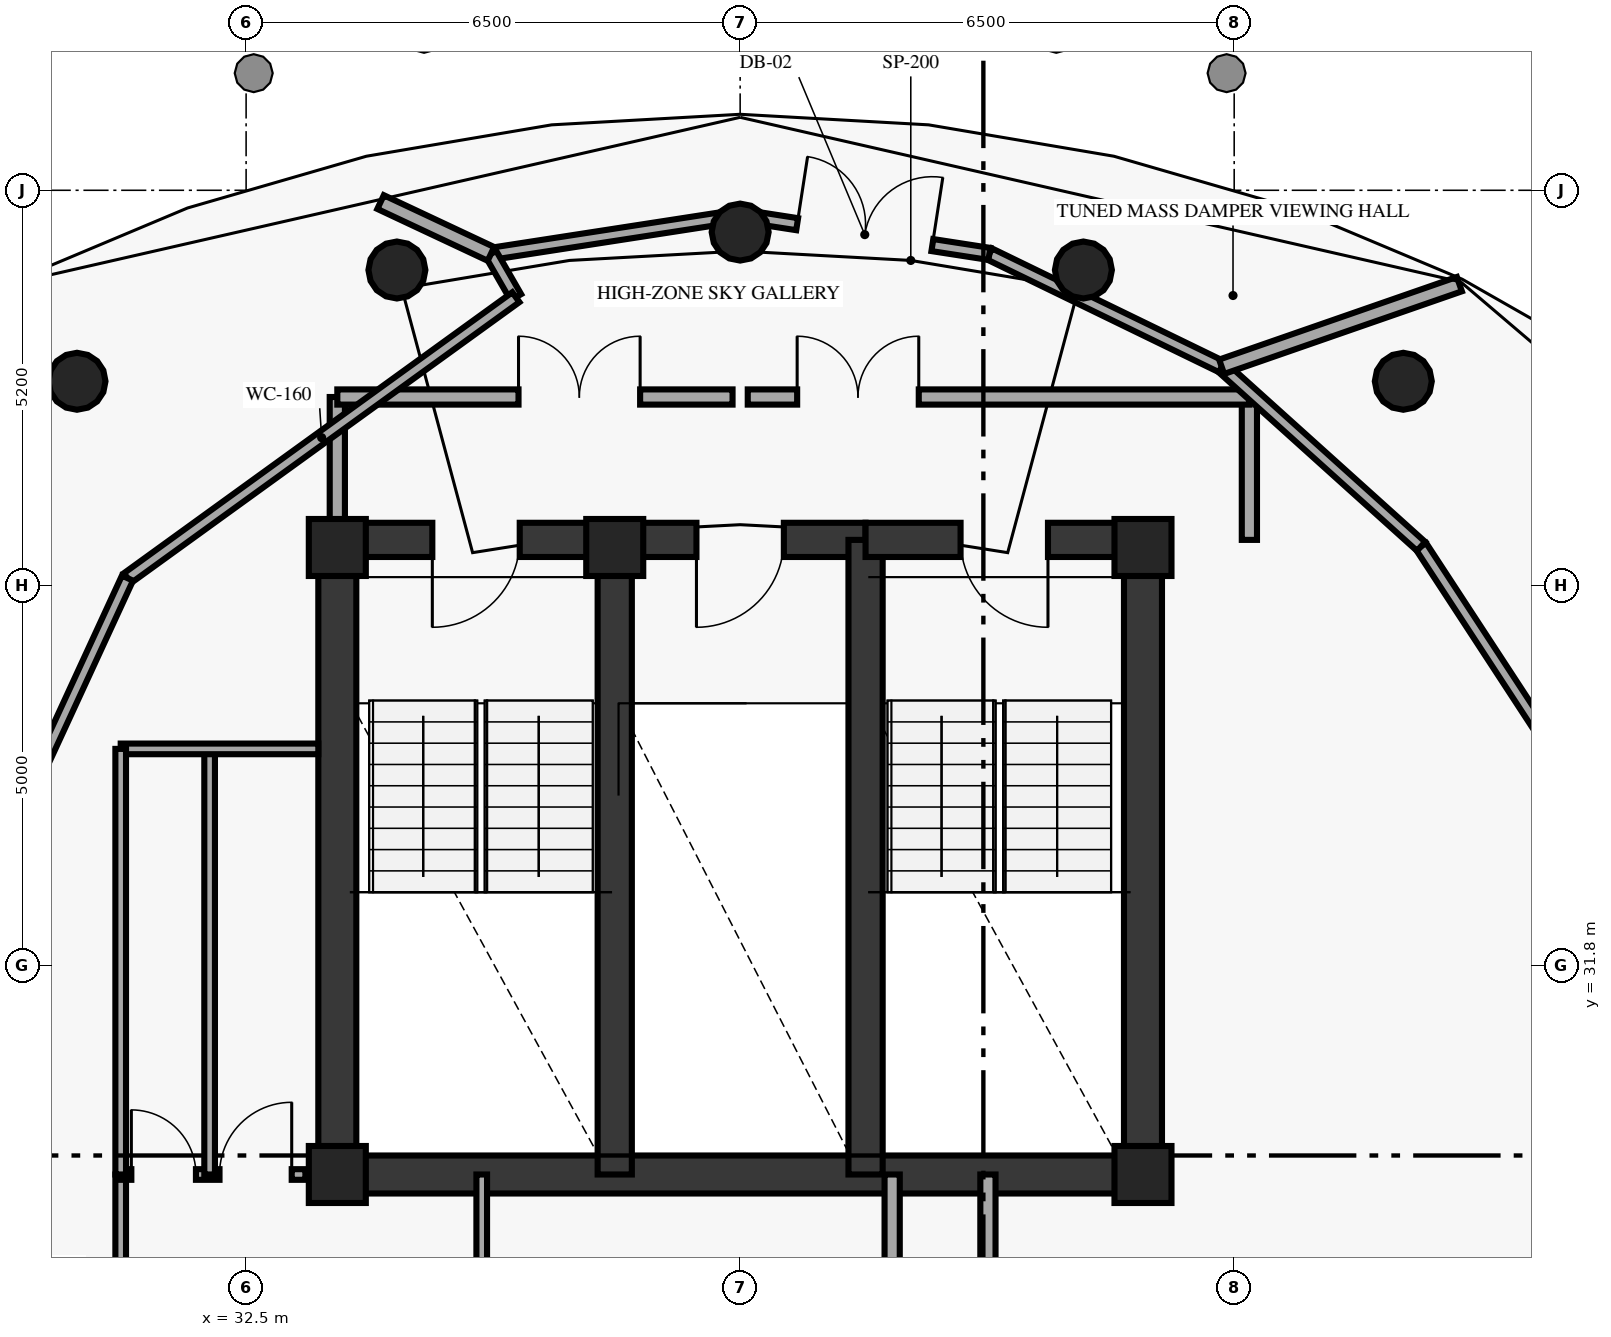
"""IFC4 building model, lengths in metres.
Left out: names, types, materials, properties, quantities, classifications, styles, units other than length and angle.
Written with IfcOpenShell. Run it as: python <this file> out.ifc"""

import sys

from ifc_helpers import new_model, si_unit, direction, frame, frame_2d, origin, origin_2d, place, context, subcontext, project, spatial, rectangle, circle, extrude, element, fill, save


model = new_model("IFC4")
c1 = context("Model", 3, precision=1e-05, world=origin(), true_north=direction((0.0, 1.0)))
c2 = subcontext(c1, "Body", "Model", "MODEL_VIEW")
j1 = project(units=[si_unit("LENGTHUNIT", "METRE"), si_unit("PLANEANGLEUNIT", "RADIAN")], contexts=[c1])
p1 = place(None, origin())
s1 = spatial("IfcSite", under=j1, at=p1, CompositionType="ELEMENT")
p2 = place(p1, origin())
s2 = spatial("IfcBuilding", under=s1, at=p2, CompositionType="ELEMENT")
p3 = place(p2, frame((0.0, 0.0, 306.8)))
s3 = spatial("IfcBuildingStorey", under=s2, at=p3, CompositionType="ELEMENT", Elevation=306.8)
for number, where, z_axis, x_axis in (
    (1, (44.3, 29.05, 0.0), (0.0, 0.0, 1.0), (1.0, 0.0, 0.0)),
    (2, (44.3, 37.3, 0.0), (0.0, 0.0, 1.0), (1.0, 0.0, 0.0)),
    (3, (37.35, 37.3, 0.0), (0.0, 0.0, 1.0), (1.0, 0.0, 0.0)),
    (4, (33.7, 37.3, 0.0), (0.0, 0.0, 1.0), (1.0, 0.0, 0.0)),
    (5, (33.7, 29.05, 0.0), (0.0, 0.0, 1.0), (1.0, 0.0, 0.0)),
):
    element("IfcColumn", number, at=place(p3, frame(where, z_axis=z_axis, x_axis=x_axis)), inside=s3, PredefinedType="PILASTER", context=c2, shape_type="SweptSolid", body=[
        extrude(rectangle(XDim=0.75, YDim=0.75, at=origin_2d()), origin(), (0.0, 0.0, 1.0), 6.18),
    ])
for number, where, z_axis, x_axis in (
    (6, (47.725, 39.487, 0.0), (0.0, 0.0, 1.0), (1.0, 0.0, 0.0)),
    (7, (43.516, 40.951, 0.0), (0.0, 0.0, 1.0), (1.0, 0.0, 0.0)),
    (8, (39.0, 41.45, 0.0), (0.0, 0.0, 1.0), (1.0, 0.0, 0.0)),
    (9, (34.484, 40.951, 0.0), (0.0, 0.0, 1.0), (1.0, 0.0, 0.0)),
    (10, (30.275, 39.487, 0.0), (0.0, 0.0, 1.0), (1.0, 0.0, 0.0)),
):
    element("IfcColumn", number, at=place(p3, frame(where, z_axis=z_axis, x_axis=x_axis)), inside=s3, PredefinedType="COLUMN", context=c2, shape_type="SweptSolid", body=[
        extrude(circle(Radius=0.375, at=origin_2d()), origin(), (0.0, 0.0, 1.0), 6.18),
    ])
for number, where, z_axis, x_axis in (
    (11, (33.7, 29.05, 0.0), (0.0, 0.0, 1.0), (0.0, 1.0, 0.0)),
    (12, (44.3, 29.05, 0.0), (0.0, 0.0, 1.0), (0.0, 1.0, 0.0)),
):
    element("IfcWall", number, at=place(p3, frame(where, z_axis=z_axis, x_axis=x_axis)), inside=s3, PredefinedType="SHEAR", context=c2, shape_type="SweptSolid", body=[
        extrude(rectangle(XDim=8.35, YDim=0.5, at=frame_2d((4.175, 0.0))), origin(), (0.0, 0.0, 1.0), 6.18),
    ])
p4 = place(p3, frame((33.7, 29.05, 0.0), z_axis=(0.0, 0.0, 1.0), x_axis=(1.0, 0.0, 0.0)))
e13 = element("IfcWall", 13, at=p4, inside=s3, PredefinedType="SHEAR", context=c2, shape_type="SweptSolid", body=[
    extrude(rectangle(XDim=10.6, YDim=0.5, at=frame_2d((5.3, 0.0))), origin(), (0.0, 0.0, 1.0), 6.18),
])
p5 = place(p3, frame((37.35, 37.4, 0.0), z_axis=(0.0, 0.0, 1.0), x_axis=(-1.0, 0.0, 0.0)))
e14 = element("IfcWall", 14, at=p5, inside=s3, PredefinedType="SHEAR", context=c2, shape_type="SweptSolid", body=[
    extrude(rectangle(XDim=3.65, YDim=0.45, at=frame_2d((1.825, 0.0))), origin(), (0.0, 0.0, 1.0), 6.18),
])
p6 = place(p5, frame((1.25, 0.0, 0.0)))
e15 = element("IfcOpeningElement", 15, at=p6, cuts=e14, PredefinedType="OPENING", context=c2, shape_type="SweptSolid", body=[
    extrude(rectangle(XDim=1.15, YDim=2.15, at=frame_2d((0.575, 1.075))), frame((0.0, 0.235, 0.0), z_axis=(0.0, -1.0, 0.0), x_axis=(1.0, 0.0, 0.0)), (0.0, 0.0, 1.0), 0.47),
])
p7 = place(p3, frame((37.35, 29.05, 0.0), z_axis=(0.0, 0.0, 1.0), x_axis=(0.0, 1.0, 0.0)))
e16 = element("IfcWall", 16, at=p7, inside=s3, PredefinedType="SHEAR", context=c2, shape_type="SweptSolid", body=[
    extrude(rectangle(XDim=8.35, YDim=0.45, at=frame_2d((4.175, 0.0))), origin(), (0.0, 0.0, 1.0), 6.18),
])
p8 = place(p3, frame((40.65, 37.4, 0.0), z_axis=(0.0, 0.0, 1.0), x_axis=(-1.0, 0.0, 0.0)))
e17 = element("IfcWall", 17, at=p8, inside=s3, PredefinedType="SHEAR", context=c2, shape_type="SweptSolid", body=[
    extrude(rectangle(XDim=3.3, YDim=0.45, at=frame_2d((1.65, 0.0))), origin(), (0.0, 0.0, 1.0), 6.18),
])
p9 = place(p8, frame((1.075, 0.0, 0.0)))
e18 = element("IfcOpeningElement", 18, at=p9, cuts=e17, PredefinedType="OPENING", context=c2, shape_type="SweptSolid", body=[
    extrude(rectangle(XDim=1.15, YDim=2.15, at=frame_2d((0.575, 1.075))), frame((0.0, 0.235, 0.0), z_axis=(0.0, -1.0, 0.0), x_axis=(1.0, 0.0, 0.0)), (0.0, 0.0, 1.0), 0.47),
])
p10 = place(p3, frame((40.65, 29.05, 0.0), z_axis=(0.0, 0.0, 1.0), x_axis=(0.0, 1.0, 0.0)))
e19 = element("IfcWall", 19, at=p10, inside=s3, PredefinedType="SHEAR", context=c2, shape_type="SweptSolid", body=[
    extrude(rectangle(XDim=8.35, YDim=0.45, at=frame_2d((4.175, 0.0))), origin(), (0.0, 0.0, 1.0), 6.18),
])
p11 = place(p3, frame((44.3, 37.4, 0.0), z_axis=(0.0, 0.0, 1.0), x_axis=(-1.0, 0.0, 0.0)))
e20 = element("IfcWall", 20, at=p11, inside=s3, PredefinedType="SHEAR", context=c2, shape_type="SweptSolid", body=[
    extrude(rectangle(XDim=3.65, YDim=0.45, at=frame_2d((1.825, 0.0))), origin(), (0.0, 0.0, 1.0), 6.18),
])
p12 = place(p11, frame((1.25, 0.0, 0.0)))
e21 = element("IfcOpeningElement", 21, at=p12, cuts=e20, PredefinedType="OPENING", context=c2, shape_type="SweptSolid", body=[
    extrude(rectangle(XDim=1.15, YDim=2.15, at=frame_2d((0.575, 1.075))), frame((0.0, 0.235, 0.0), z_axis=(0.0, -1.0, 0.0), x_axis=(1.0, 0.0, 0.0)), (0.0, 0.0, 1.0), 0.47),
])
for number, where, z_axis, x_axis in (
    (22, (33.7, 37.4, 0.0), (0.0, 0.0, 1.0), (0.0, 1.0, 0.0)),
    (23, (45.7, 37.4, 0.0), (0.0, 0.0, 1.0), (0.0, 1.0, 0.0)),
):
    element("IfcWall", number, at=place(p3, frame(where, z_axis=z_axis, x_axis=x_axis)), inside=s3, PredefinedType="SOLIDWALL", context=c2, shape_type="SweptSolid", body=[
        extrude(rectangle(XDim=1.88, YDim=0.2, at=frame_2d((0.94, 0.0))), origin(), (0.0, 0.0, 1.0), 6.18),
    ])
p13 = place(p3, frame((38.9, 39.28, 0.0), z_axis=(0.0, 0.0, 1.0), x_axis=(-1.0, 0.0, 0.0)))
e24 = element("IfcWall", 24, at=p13, inside=s3, PredefinedType="SOLIDWALL", context=c2, shape_type="SweptSolid", body=[
    extrude(rectangle(XDim=5.2, YDim=0.2, at=frame_2d((2.6, 0.0))), origin(), (0.0, 0.0, 1.0), 6.18),
])
p14 = place(p13, frame((1.216, 0.0, 0.0)))
e25 = element("IfcOpeningElement", 25, at=p14, cuts=e24, PredefinedType="OPENING", context=c2, shape_type="SweptSolid", body=[
    extrude(rectangle(XDim=1.6, YDim=2.2, at=frame_2d((0.8, 1.1))), frame((0.0, 0.11, 0.0), z_axis=(0.0, -1.0, 0.0), x_axis=(1.0, 0.0, 0.0)), (0.0, 0.0, 1.0), 0.22),
])
p15 = place(p3, frame((45.7, 39.28, 0.0), z_axis=(0.0, 0.0, 1.0), x_axis=(-1.0, 0.0, 0.0)))
e26 = element("IfcWall", 26, at=p15, inside=s3, PredefinedType="SOLIDWALL", context=c2, shape_type="SweptSolid", body=[
    extrude(rectangle(XDim=6.6, YDim=0.2, at=frame_2d((3.3, 0.0))), origin(), (0.0, 0.0, 1.0), 6.18),
])
p16 = place(p15, frame((4.35, 0.0, 0.0)))
e27 = element("IfcOpeningElement", 27, at=p16, cuts=e26, PredefinedType="OPENING", context=c2, shape_type="SweptSolid", body=[
    extrude(rectangle(XDim=1.6, YDim=2.2, at=frame_2d((0.8, 1.1))), frame((0.0, 0.11, 0.0), z_axis=(0.0, -1.0, 0.0), x_axis=(1.0, 0.0, 0.0)), (0.0, 0.0, 1.0), 0.22),
])
p17 = place(p3, frame((35.6, 27.28, 0.0), z_axis=(0.0, 0.0, 1.0), x_axis=(0.0, 1.0, 0.0)))
e28 = element("IfcWall", 28, at=p17, inside=s3, PredefinedType="PARTITIONING", context=c2, shape_type="SweptSolid", body=[
    extrude(rectangle(XDim=1.77, YDim=0.14, at=frame_2d((0.885, 0.0))), origin(), (0.0, 0.0, 1.0), 6.18),
])
p18 = place(p3, frame((41.0, 27.28, 0.0), z_axis=(0.0, 0.0, 1.0), x_axis=(0.0, 1.0, 0.0)))
e29 = element("IfcWall", 29, at=p18, inside=s3, PredefinedType="SOLIDWALL", context=c2, shape_type="SweptSolid", body=[
    extrude(rectangle(XDim=1.77, YDim=0.2, at=frame_2d((0.885, 0.0))), origin(), (0.0, 0.0, 1.0), 5.23),
])
p19 = place(p3, frame((42.26, 27.28, 0.0), z_axis=(0.0, 0.0, 1.0), x_axis=(0.0, 1.0, 0.0)))
e30 = element("IfcWall", 30, at=p19, inside=s3, PredefinedType="SOLIDWALL", context=c2, shape_type="SweptSolid", body=[
    extrude(rectangle(XDim=1.77, YDim=0.2, at=frame_2d((0.885, 0.0))), origin(), (0.0, 0.0, 1.0), 6.18),
])
p20 = place(p3, frame((30.85, 27.24, 0.0), z_axis=(0.0, 0.0, 1.0), x_axis=(0.0, 1.0, 0.0)))
e31 = element("IfcWall", 31, at=p20, inside=s3, PredefinedType="PARTITIONING", context=c2, shape_type="SweptSolid", body=[
    extrude(rectangle(XDim=1.81, YDim=0.14, at=frame_2d((0.905, 0.0))), origin(), (0.0, 0.0, 1.0), 6.18),
])
p21 = place(p3, frame((30.85, 29.05, 0.0), z_axis=(0.0, 0.0, 1.0), x_axis=(1.0, 0.0, 0.0)))
e32 = element("IfcWall", 32, at=p21, inside=s3, PredefinedType="PARTITIONING", context=c2, shape_type="SweptSolid", body=[
    extrude(rectangle(XDim=2.43, YDim=0.14, at=frame_2d((1.215, 0.0))), origin(), (0.0, 0.0, 1.0), 6.18),
])
p22 = place(p21, frame((0.14, 0.0, 0.0)))
e33 = element("IfcOpeningElement", 33, at=p22, cuts=e32, PredefinedType="OPENING", context=c2, shape_type="SweptSolid", body=[
    extrude(rectangle(XDim=0.85, YDim=2.1, at=frame_2d((0.425, 1.05))), frame((0.0, 0.08, 0.0), z_axis=(0.0, -1.0, 0.0), x_axis=(1.0, 0.0, 0.0)), (0.0, 0.0, 1.0), 0.16),
])
p23 = place(p21, frame((1.3, 0.0, 0.0)))
e34 = element("IfcOpeningElement", 34, at=p23, cuts=e32, PredefinedType="OPENING", context=c2, shape_type="SweptSolid", body=[
    extrude(rectangle(XDim=0.95, YDim=2.1, at=frame_2d((0.475, 1.05))), frame((0.0, 0.08, 0.0), z_axis=(0.0, -1.0, 0.0), x_axis=(1.0, 0.0, 0.0)), (0.0, 0.0, 1.0), 0.16),
])
p24 = place(p3, frame((32.02, 29.05, 0.0), z_axis=(0.0, 0.0, 1.0), x_axis=(0.0, 1.0, 0.0)))
e35 = element("IfcWall", 35, at=p24, inside=s3, PredefinedType="PARTITIONING", context=c2, shape_type="SweptSolid", body=[
    extrude(rectangle(XDim=5.6, YDim=0.14, at=frame_2d((2.8, 0.0))), origin(), (0.0, 0.0, 1.0), 6.18),
])
p25 = place(p3, frame((30.85, 34.65, 0.0), z_axis=(0.0, 0.0, 1.0), x_axis=(1.0, 0.0, 0.0)))
e36 = element("IfcWall", 36, at=p25, inside=s3, PredefinedType="PARTITIONING", context=c2, shape_type="SweptSolid", body=[
    extrude(rectangle(XDim=2.6, YDim=0.14, at=frame_2d((1.3, 0.0))), origin(), (0.0, 0.0, 1.0), 6.18),
])
p26 = place(p3, frame((30.85, 29.05, 0.0), z_axis=(0.0, 0.0, 1.0), x_axis=(0.0, 1.0, 0.0)))
e37 = element("IfcWall", 37, at=p26, inside=s3, PredefinedType="PARTITIONING", context=c2, shape_type="SweptSolid", body=[
    extrude(rectangle(XDim=5.6, YDim=0.14, at=frame_2d((2.8, 0.0))), origin(), (0.0, 0.0, 1.0), 6.18),
])
p27 = place(p3, frame((49.973, 34.235, 0.0), z_axis=(0.0, 0.0, 1.0), x_axis=(-0.547283325884, 0.836947406477, 0.0)))
e38 = element("IfcWall", 38, at=p27, inside=s3, PredefinedType="PARTITIONING", context=c2, shape_type="SweptSolid", body=[
    extrude(rectangle(XDim=3.68, YDim=0.16, at=frame_2d((1.84, 0.0))), origin(), (0.0, 0.0, 1.0), 6.18),
])
p28 = place(p3, frame((47.959, 37.315, 0.0), z_axis=(0.0, 0.0, 1.0), x_axis=(-0.743094720901, 0.669186248939, 0.0)))
e39 = element("IfcWall", 39, at=p28, inside=s3, PredefinedType="PARTITIONING", context=c2, shape_type="SweptSolid", body=[
    extrude(rectangle(XDim=3.531, YDim=0.16, at=frame_2d((1.766, 0.0))), origin(), (0.0, 0.0, 1.0), 6.18),
])
p29 = place(p3, frame((45.335, 39.678, 0.0), z_axis=(0.0, 0.0, 1.0), x_axis=(-0.899414545514, 0.437096642995, 0.0)))
e40 = element("IfcWall", 40, at=p29, inside=s3, PredefinedType="PARTITIONING", context=c2, shape_type="SweptSolid", body=[
    extrude(rectangle(XDim=3.398, YDim=0.16, at=frame_2d((1.699, 0.0))), origin(), (0.0, 0.0, 1.0), 6.18),
])
p30 = place(p3, frame((39.0, 41.67, 0.0), z_axis=(0.0, 0.0, 1.0), x_axis=(0.988264270775, -0.15275382519, 0.0)))
e41 = element("IfcWall", 41, at=p30, inside=s3, PredefinedType="PARTITIONING", context=c2, shape_type="SweptSolid", body=[
    extrude(rectangle(XDim=3.318, YDim=0.16, at=frame_2d((1.659, 0.0))), origin(), (0.0, 0.0, 1.0), 4.73),
])
p31 = place(p30, frame((0.759, 0.0, 0.0)))
e42 = element("IfcOpeningElement", 42, at=p31, cuts=e41, PredefinedType="OPENING", context=c2, shape_type="SweptSolid", body=[
    extrude(rectangle(XDim=1.8, YDim=2.3, at=frame_2d((0.9, 1.15))), frame((0.0, 0.09, 0.0), z_axis=(0.0, -1.0, 0.0), x_axis=(1.0, 0.0, 0.0)), (0.0, 0.0, 1.0), 0.18),
])
p32 = place(p3, frame((39.0, 41.67, 0.0), z_axis=(0.0, 0.0, 1.0), x_axis=(-0.988264270775, -0.15275382519, 0.0)))
e43 = element("IfcWall", 43, at=p32, inside=s3, PredefinedType="PARTITIONING", context=c2, shape_type="SweptSolid", body=[
    extrude(rectangle(XDim=3.318, YDim=0.16, at=frame_2d((1.659, 0.0))), origin(), (0.0, 0.0, 1.0), 4.73),
])
p33 = place(p3, frame((36.049, 40.593, 0.0), z_axis=(0.0, 0.0, 1.0), x_axis=(-0.498854625265, 0.866685677078, 0.0)))
e44 = element("IfcWall", 44, at=p33, inside=s3, PredefinedType="PARTITIONING", context=c2, shape_type="SweptSolid", body=[
    extrude(rectangle(XDim=0.658, YDim=0.16, at=frame_2d((0.329, 0.0))), origin(), (0.0, 0.0, 1.0), 6.18),
])
p34 = place(p3, frame((45.335, 39.678, 0.0), z_axis=(0.0, 0.0, 1.0), x_axis=(0.944596217107, 0.328234651777, 0.0)))
e45 = element("IfcWall", 45, at=p34, inside=s3, PredefinedType="PARTITIONING", context=c2, shape_type="SweptSolid", body=[
    extrude(rectangle(XDim=3.311, YDim=0.2, at=frame_2d((1.656, 0.0))), origin(), (0.0, 0.0, 1.0), 6.18),
])
p35 = place(p3, frame((35.721, 41.163, 0.0), z_axis=(0.0, 0.0, 1.0), x_axis=(-0.905146121581, 0.425100574672, 0.0)))
e46 = element("IfcWall", 46, at=p35, inside=s3, PredefinedType="PARTITIONING", context=c2, shape_type="SweptSolid", body=[
    extrude(rectangle(XDim=1.604, YDim=0.2, at=frame_2d((0.802, 0.0))), origin(), (0.0, 0.0, 1.0), 6.18),
])
p36 = place(p3, frame((36.049, 40.593, 0.0), z_axis=(0.0, 0.0, 1.0), x_axis=(-0.810271736342, -0.58605436035, 0.0)))
e47 = element("IfcWall", 47, at=p36, inside=s3, PredefinedType="PARTITIONING", context=c2, shape_type="SweptSolid", body=[
    extrude(rectangle(XDim=6.307, YDim=0.16, at=frame_2d((3.153, 0.0))), origin(), (0.0, 0.0, 1.0), 6.18),
])
p37 = place(p3, frame((30.939, 36.897, 0.0), z_axis=(0.0, 0.0, 1.0), x_axis=(-0.41866934876, -0.908138742929, 0.0)))
e48 = element("IfcWall", 48, at=p37, inside=s3, PredefinedType="PARTITIONING", context=c2, shape_type="SweptSolid", body=[
    extrude(rectangle(XDim=7.048, YDim=0.16, at=frame_2d((3.524, 0.0))), origin(), (0.0, 0.0, 1.0), 6.18),
])
p38 = place(p6, origin())
e49 = element("IfcDoor", 49, at=p38, inside=s3, OperationType="SINGLE_SWING_RIGHT", PredefinedType="DOOR", context=c2, shape_type="SweptSolid", body=[
    extrude(rectangle(XDim=1.15, YDim=2.15, at=frame_2d((0.575, 1.075))), frame((0.0, 0.025, 0.0), z_axis=(0.0, -1.0, 0.0), x_axis=(1.0, 0.0, 0.0)), (0.0, 0.0, 1.0), 0.05),
])
fill(e15, e49)
p39 = place(p9, origin())
e50 = element("IfcDoor", 50, at=p39, inside=s3, OperationType="SINGLE_SWING_RIGHT", PredefinedType="DOOR", context=c2, shape_type="SweptSolid", body=[
    extrude(rectangle(XDim=1.15, YDim=2.15, at=frame_2d((0.575, 1.075))), frame((0.0, 0.025, 0.0), z_axis=(0.0, -1.0, 0.0), x_axis=(1.0, 0.0, 0.0)), (0.0, 0.0, 1.0), 0.05),
])
fill(e18, e50)
p40 = place(p12, origin())
e51 = element("IfcDoor", 51, at=p40, inside=s3, OperationType="SINGLE_SWING_LEFT", PredefinedType="DOOR", context=c2, shape_type="SweptSolid", body=[
    extrude(rectangle(XDim=1.15, YDim=2.15, at=frame_2d((0.575, 1.075))), frame((0.0, 0.025, 0.0), z_axis=(0.0, -1.0, 0.0), x_axis=(1.0, 0.0, 0.0)), (0.0, 0.0, 1.0), 0.05),
])
fill(e21, e51)
p41 = place(p14, origin())
e52 = element("IfcDoor", 52, at=p41, inside=s3, OperationType="DOUBLE_DOOR_SINGLE_SWING", PredefinedType="DOOR", context=c2, shape_type="SweptSolid", body=[
    extrude(rectangle(XDim=1.6, YDim=2.2, at=frame_2d((0.8, 1.1))), frame((0.0, 0.025, 0.0), z_axis=(0.0, -1.0, 0.0), x_axis=(1.0, 0.0, 0.0)), (0.0, 0.0, 1.0), 0.05),
])
fill(e25, e52)
p42 = place(p16, origin())
e53 = element("IfcDoor", 53, at=p42, inside=s3, OperationType="DOUBLE_DOOR_SINGLE_SWING", PredefinedType="DOOR", context=c2, shape_type="SweptSolid", body=[
    extrude(rectangle(XDim=1.6, YDim=2.2, at=frame_2d((0.8, 1.1))), frame((0.0, 0.025, 0.0), z_axis=(0.0, -1.0, 0.0), x_axis=(1.0, 0.0, 0.0)), (0.0, 0.0, 1.0), 0.05),
])
fill(e27, e53)
p43 = place(p22, origin())
e54 = element("IfcDoor", 54, at=p43, inside=s3, OperationType="SINGLE_SWING_LEFT", PredefinedType="DOOR", context=c2, shape_type="SweptSolid", body=[
    extrude(rectangle(XDim=0.85, YDim=2.1, at=frame_2d((0.425, 1.05))), frame((0.0, 0.025, 0.0), z_axis=(0.0, -1.0, 0.0), x_axis=(1.0, 0.0, 0.0)), (0.0, 0.0, 1.0), 0.05),
])
fill(e33, e54)
p44 = place(p23, origin())
e55 = element("IfcDoor", 55, at=p44, inside=s3, OperationType="SINGLE_SWING_RIGHT", PredefinedType="DOOR", context=c2, shape_type="SweptSolid", body=[
    extrude(rectangle(XDim=0.95, YDim=2.1, at=frame_2d((0.475, 1.05))), frame((0.0, 0.025, 0.0), z_axis=(0.0, -1.0, 0.0), x_axis=(1.0, 0.0, 0.0)), (0.0, 0.0, 1.0), 0.05),
])
fill(e34, e55)
p45 = place(p31, origin())
e56 = element("IfcDoor", 56, at=p45, inside=s3, OperationType="DOUBLE_DOOR_SINGLE_SWING", PredefinedType="DOOR", context=c2, shape_type="SweptSolid", body=[
    extrude(rectangle(XDim=1.8, YDim=2.3, at=frame_2d((0.9, 1.15))), frame((0.0, 0.025, 0.0), z_axis=(0.0, -1.0, 0.0), x_axis=(1.0, 0.0, 0.0)), (0.0, 0.0, 1.0), 0.05),
])
fill(e42, e56)
save(model, sys.argv[1])
